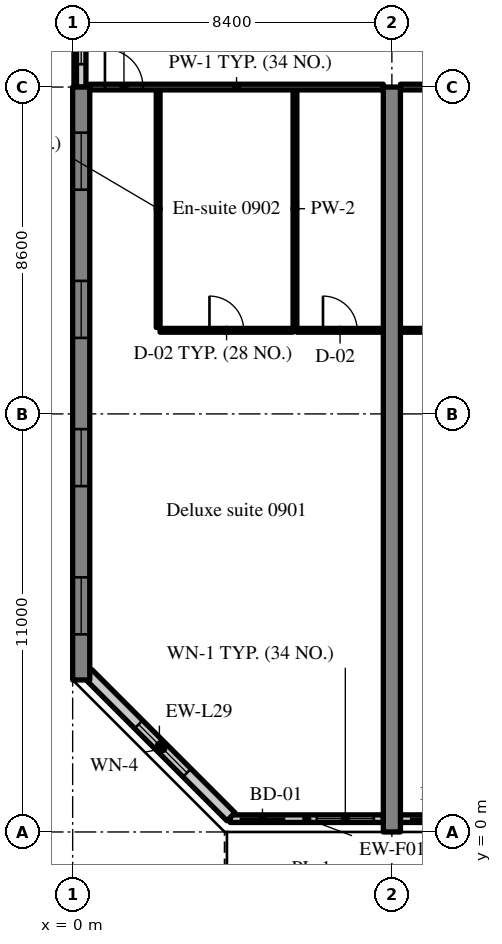
"""IFC4 building model, lengths in metres.
Left out: names, types, materials, properties, quantities, classifications, styles, units other than length and angle.
Written with IfcOpenShell. Run it as: python <this file> out.ifc"""

import sys

from ifc_helpers import new_model, si_unit, direction, frame, frame_2d, origin, place, context, subcontext, project, spatial, rectangle, extrude, source, transform, mapped, element, fill, save


model = new_model("IFC4")
c1 = context("Model", 3, precision=1e-05, world=origin(), true_north=direction((0.0, 1.0)))
c2 = subcontext(c1, "Body", "Model", "MODEL_VIEW")
j1 = project(units=[si_unit("LENGTHUNIT", "METRE"), si_unit("PLANEANGLEUNIT", "RADIAN")], contexts=[c1])
p1 = place(None, origin())
s1 = spatial("IfcSite", under=j1, at=p1, CompositionType="ELEMENT")
p2 = place(p1, origin())
s2 = spatial("IfcBuilding", under=s1, at=p2, CompositionType="ELEMENT")
p3 = place(p2, frame((0.0, 0.0, 43.0)))
s3 = spatial("IfcBuildingStorey", under=s2, at=p3, CompositionType="ELEMENT", Elevation=43.0)
m1 = source(origin(), c2, "Body", "SweptSolid", [
    extrude(rectangle(XDim=15.6, YDim=0.45, at=frame_2d((7.8, 0.0))), origin(), (0.0, 0.0, 1.0), 3.52),
])
p4 = place(p3, frame((0.225, 4.0, 0.0), z_axis=(0.0, 0.0, 1.0), x_axis=(0.0, 1.0, 0.0)))
e1 = element("IfcWall", 1, at=p4, inside=s3, PredefinedType="SHEAR", context=c2, shape_type="MappedRepresentation", body=[
    mapped(m1, transform((0.0, 0.0, 0.0), scale=1.0)),
])
m2 = source(origin(), c2, "Body", "SweptSolid", [
    extrude(rectangle(XDim=1.5, YDim=1.5, at=frame_2d((0.75, 0.75))), frame((0.0, 0.235, 0.0), z_axis=(0.0, -1.0, 0.0), x_axis=(1.0, 0.0, 0.0)), (0.0, 0.0, 1.0), 0.47),
])
p5 = place(p4, frame((1.2, 0.0, 0.9)))
e2 = element("IfcOpeningElement", 2, at=p5, cuts=e1, PredefinedType="OPENING", context=c2, shape_type="MappedRepresentation", body=[
    mapped(m2, transform((0.0, 0.0, 0.0), scale=1.0)),
])
p6 = place(p4, frame((5.1, 0.0, 0.9)))
e3 = element("IfcOpeningElement", 3, at=p6, cuts=e1, PredefinedType="OPENING", context=c2, shape_type="MappedRepresentation", body=[
    mapped(m2, transform((0.0, 0.0, 0.0), scale=1.0)),
])
p7 = place(p4, frame((9.0, 0.0, 0.9)))
e4 = element("IfcOpeningElement", 4, at=p7, cuts=e1, PredefinedType="OPENING", context=c2, shape_type="MappedRepresentation", body=[
    mapped(m2, transform((0.0, 0.0, 0.0), scale=1.0)),
])
p8 = place(p4, frame((12.9, 0.0, 0.9)))
e5 = element("IfcOpeningElement", 5, at=p8, cuts=e1, PredefinedType="OPENING", context=c2, shape_type="MappedRepresentation", body=[
    mapped(m2, transform((0.0, 0.0, 0.0), scale=1.0)),
])
m3 = source(origin(), c2, "Body", "SweptSolid", [
    extrude(rectangle(XDim=19.6, YDim=0.45, at=frame_2d((9.8, 0.0))), origin(), (0.0, 0.0, 1.0), 3.52),
])
p9 = place(p3, frame((8.4, 0.0, 0.0), z_axis=(0.0, 0.0, 1.0), x_axis=(0.0, 1.0, 0.0)))
e6 = element("IfcWall", 6, at=p9, inside=s3, PredefinedType="SHEAR", context=c2, shape_type="MappedRepresentation", body=[
    mapped(m3, transform((0.0, 0.0, 0.0), scale=1.0)),
])
m4 = source(origin(), c2, "Body", "SweptSolid", [
    extrude(rectangle(XDim=4.03, YDim=0.2, at=frame_2d((2.015, 0.0))), origin(), (0.0, 0.0, 1.0), 2.82),
])
p10 = place(p3, frame((4.145, 0.35, 0.0), z_axis=(0.0, 0.0, 1.0), x_axis=(1.0, 0.0, 0.0)))
e7 = element("IfcWall", 7, at=p10, inside=s3, PredefinedType="SOLIDWALL", context=c2, shape_type="MappedRepresentation", body=[
    mapped(m4, transform((0.0, 0.0, 0.0), scale=1.0)),
])
m5 = source(origin(), c2, "Body", "SweptSolid", [
    extrude(rectangle(XDim=1.2, YDim=2.4, at=frame_2d((0.6, 1.2))), frame((0.0, 0.11, 0.0), z_axis=(0.0, -1.0, 0.0), x_axis=(1.0, 0.0, 0.0)), (0.0, 0.0, 1.0), 0.22),
])
p11 = place(p10, frame((0.25, 0.0, 0.0)))
e8 = element("IfcOpeningElement", 8, at=p11, cuts=e7, PredefinedType="OPENING", context=c2, shape_type="MappedRepresentation", body=[
    mapped(m5, transform((0.0, 0.0, 0.0), scale=1.0)),
])
m6 = source(origin(), c2, "Body", "SweptSolid", [
    extrude(rectangle(XDim=1.5, YDim=1.5, at=frame_2d((0.75, 0.75))), frame((0.0, 0.11, 0.0), z_axis=(0.0, -1.0, 0.0), x_axis=(1.0, 0.0, 0.0)), (0.0, 0.0, 1.0), 0.22),
])
p12 = place(p10, frame((2.28, 0.0, 0.9)))
e9 = element("IfcOpeningElement", 9, at=p12, cuts=e7, PredefinedType="OPENING", context=c2, shape_type="MappedRepresentation", body=[
    mapped(m6, transform((0.0, 0.0, 0.0), scale=1.0)),
])
m7 = source(origin(), c2, "Body", "SweptSolid", [
    extrude(rectangle(XDim=3.525, YDim=0.2, at=frame_2d((1.762, 0.0))), origin(), (0.0, 0.0, 1.0), 2.82),
])
p13 = place(p3, frame((8.625, 0.35, 0.0), z_axis=(0.0, 0.0, 1.0), x_axis=(1.0, 0.0, 0.0)))
e10 = element("IfcWall", 10, at=p13, inside=s3, PredefinedType="SOLIDWALL", context=c2, shape_type="MappedRepresentation", body=[
    mapped(m7, transform((0.0, 0.0, 0.0), scale=1.0)),
])
p14 = place(p13, frame((0.25, 0.0, 0.0)))
e11 = element("IfcOpeningElement", 11, at=p14, cuts=e10, PredefinedType="OPENING", context=c2, shape_type="MappedRepresentation", body=[
    mapped(m5, transform((0.0, 0.0, 0.0), scale=1.0)),
])
p15 = place(p13, frame((1.775, 0.0, 0.9)))
e12 = element("IfcOpeningElement", 12, at=p15, cuts=e10, PredefinedType="OPENING", context=c2, shape_type="MappedRepresentation", body=[
    mapped(m6, transform((0.0, 0.0, 0.0), scale=1.0)),
])
m8 = source(origin(), c2, "Body", "SweptSolid", [
    extrude(rectangle(XDim=5.326, YDim=0.3, at=frame_2d((2.663, 0.0))), origin(), (0.0, 0.0, 1.0), 3.52),
])
p16 = place(p3, frame((0.4, 4.166, 0.0), z_axis=(0.0, 0.0, 1.0), x_axis=(0.707106781187, -0.707106781187, 0.0)))
e13 = element("IfcWall", 13, at=p16, inside=s3, PredefinedType="SOLIDWALL", context=c2, shape_type="MappedRepresentation", body=[
    mapped(m8, transform((0.0, 0.0, 0.0), scale=1.0)),
])
m9 = source(origin(), c2, "Body", "SweptSolid", [
    extrude(rectangle(XDim=1.8, YDim=1.5, at=frame_2d((0.9, 0.75))), frame((0.0, 0.16, 0.0), z_axis=(0.0, -1.0, 0.0), x_axis=(1.0, 0.0, 0.0)), (0.0, 0.0, 1.0), 0.32),
])
p17 = place(p16, frame((1.889, 0.0, 0.9)))
e14 = element("IfcOpeningElement", 14, at=p17, cuts=e13, PredefinedType="OPENING", context=c2, shape_type="MappedRepresentation", body=[
    mapped(m9, transform((0.0, 0.0, 0.0), scale=1.0)),
])
m10 = source(origin(), c2, "Body", "SweptSolid", [
    extrude(rectangle(XDim=2.4, YDim=0.25, at=frame_2d((1.2, 0.0))), origin(), (0.0, 0.0, 1.0), 2.62),
])
p18 = place(p3, frame((0.225, 19.6, 0.0), z_axis=(0.0, 0.0, 1.0), x_axis=(0.0, 1.0, 0.0)))
e15 = element("IfcWall", 15, at=p18, inside=s3, PredefinedType="SOLIDWALL", context=c2, shape_type="MappedRepresentation", body=[
    mapped(m10, transform((0.0, 0.0, 0.0), scale=1.0)),
])
m11 = source(origin(), c2, "Body", "SweptSolid", [
    extrude(rectangle(XDim=1.2, YDim=1.5, at=frame_2d((0.6, 0.75))), frame((0.0, 0.135, 0.0), z_axis=(0.0, -1.0, 0.0), x_axis=(1.0, 0.0, 0.0)), (0.0, 0.0, 1.0), 0.27),
])
p19 = place(p18, frame((0.6, 0.0, 0.9)))
e16 = element("IfcOpeningElement", 16, at=p19, cuts=e15, PredefinedType="OPENING", context=c2, shape_type="MappedRepresentation", body=[
    mapped(m11, transform((0.0, 0.0, 0.0), scale=1.0)),
])
m12 = source(origin(), c2, "Body", "SweptSolid", [
    extrude(rectangle(XDim=6.25, YDim=0.1, at=frame_2d((3.125, 0.0))), origin(), (0.0, 0.0, 1.0), 3.52),
])
for number, where, z_axis, x_axis in (
    (17, (2.25, 13.275, 0.0), (0.0, 0.0, 1.0), (0.0, 1.0, 0.0)),
    (18, (5.85, 13.275, 0.0), (0.0, 0.0, 1.0), (0.0, 1.0, 0.0)),
):
    element("IfcWall", number, at=place(p3, frame(where, z_axis=z_axis, x_axis=x_axis)), inside=s3, PredefinedType="PARTITIONING", context=c2, shape_type="MappedRepresentation", body=[
        mapped(m12, transform((0.0, 0.0, 0.0), scale=1.0)),
    ])
m13 = source(origin(), c2, "Body", "SweptSolid", [
    extrude(rectangle(XDim=3.5, YDim=0.1, at=frame_2d((1.75, 0.0))), origin(), (0.0, 0.0, 1.0), 3.52),
])
p20 = place(p3, frame((2.3, 13.2, 0.0), z_axis=(0.0, 0.0, 1.0), x_axis=(1.0, 0.0, 0.0)))
e19 = element("IfcWall", 19, at=p20, inside=s3, PredefinedType="PARTITIONING", context=c2, shape_type="MappedRepresentation", body=[
    mapped(m13, transform((0.0, 0.0, 0.0), scale=1.0)),
])
m14 = source(origin(), c2, "Body", "SweptSolid", [
    extrude(rectangle(XDim=0.9, YDim=2.1, at=frame_2d((0.45, 1.05))), frame((0.0, 0.06, 0.0), z_axis=(0.0, -1.0, 0.0), x_axis=(1.0, 0.0, 0.0)), (0.0, 0.0, 1.0), 0.12),
])
p21 = place(p20, frame((1.3, 0.0, 0.0)))
e20 = element("IfcOpeningElement", 20, at=p21, cuts=e19, PredefinedType="OPENING", context=c2, shape_type="MappedRepresentation", body=[
    mapped(m14, transform((0.0, 0.0, 0.0), scale=1.0)),
])
m15 = source(origin(), c2, "Body", "SweptSolid", [
    extrude(rectangle(XDim=2.275, YDim=0.1, at=frame_2d((1.138, 0.0))), origin(), (0.0, 0.0, 1.0), 3.52),
])
p22 = place(p3, frame((5.9, 13.2, 0.0), z_axis=(0.0, 0.0, 1.0), x_axis=(1.0, 0.0, 0.0)))
e21 = element("IfcWall", 21, at=p22, inside=s3, PredefinedType="PARTITIONING", context=c2, shape_type="MappedRepresentation", body=[
    mapped(m15, transform((0.0, 0.0, 0.0), scale=1.0)),
])
p23 = place(p22, frame((0.687, 0.0, 0.0)))
e22 = element("IfcOpeningElement", 22, at=p23, cuts=e21, PredefinedType="OPENING", context=c2, shape_type="MappedRepresentation", body=[
    mapped(m14, transform((0.0, 0.0, 0.0), scale=1.0)),
])
m16 = source(origin(), c2, "Body", "SweptSolid", [
    extrude(rectangle(XDim=7.725, YDim=0.15, at=frame_2d((3.863, 0.0))), origin(), (0.0, 0.0, 1.0), 2.82),
])
p24 = place(p3, frame((0.45, 19.6, 0.0), z_axis=(0.0, 0.0, 1.0), x_axis=(1.0, 0.0, 0.0)))
e23 = element("IfcWall", 23, at=p24, inside=s3, PredefinedType="PARTITIONING", context=c2, shape_type="MappedRepresentation", body=[
    mapped(m16, transform((0.0, 0.0, 0.0), scale=1.0)),
])
m17 = source(origin(), c2, "Body", "SweptSolid", [
    extrude(rectangle(XDim=1.0, YDim=2.1, at=frame_2d((0.5, 1.05))), frame((0.0, 0.085, 0.0), z_axis=(0.0, -1.0, 0.0), x_axis=(1.0, 0.0, 0.0)), (0.0, 0.0, 1.0), 0.17),
])
p25 = place(p24, frame((0.4, 0.0, 0.0)))
e24 = element("IfcOpeningElement", 24, at=p25, cuts=e23, PredefinedType="OPENING", context=c2, shape_type="MappedRepresentation", body=[
    mapped(m17, transform((0.0, 0.0, 0.0), scale=1.0)),
])
m18 = source(origin(), c2, "Body", "SweptSolid", [
    extrude(rectangle(XDim=2.05, YDim=0.1, at=frame_2d((1.025, 0.0))), origin(), (0.0, 0.0, 1.0), 3.52),
])
p26 = place(p3, frame((8.625, 13.2, 0.0), z_axis=(0.0, 0.0, 1.0), x_axis=(1.0, 0.0, 0.0)))
e25 = element("IfcWall", 25, at=p26, inside=s3, PredefinedType="PARTITIONING", context=c2, shape_type="MappedRepresentation", body=[
    mapped(m18, transform((0.0, 0.0, 0.0), scale=1.0)),
])
p27 = place(p26, frame((0.575, 0.0, 0.0)))
e26 = element("IfcOpeningElement", 26, at=p27, cuts=e25, PredefinedType="OPENING", context=c2, shape_type="MappedRepresentation", body=[
    mapped(m14, transform((0.0, 0.0, 0.0), scale=1.0)),
])
m19 = source(origin(), c2, "Body", "SweptSolid", [
    extrude(rectangle(XDim=3.9, YDim=0.15, at=frame_2d((1.95, 0.0))), origin(), (0.0, 0.0, 1.0), 2.82),
])
p28 = place(p3, frame((8.625, 19.6, 0.0), z_axis=(0.0, 0.0, 1.0), x_axis=(1.0, 0.0, 0.0)))
e27 = element("IfcWall", 27, at=p28, inside=s3, PredefinedType="PARTITIONING", context=c2, shape_type="MappedRepresentation", body=[
    mapped(m19, transform((0.0, 0.0, 0.0), scale=1.0)),
])
p29 = place(p28, frame((2.5, 0.0, 0.0)))
e28 = element("IfcOpeningElement", 28, at=p29, cuts=e27, PredefinedType="OPENING", context=c2, shape_type="MappedRepresentation", body=[
    mapped(m17, transform((0.0, 0.0, 0.0), scale=1.0)),
])
m20 = source(origin(), c2, "Body", "SweptSolid", [
    extrude(rectangle(XDim=1.2, YDim=2.4, at=frame_2d((0.6, 1.2))), frame((0.0, 0.025, 0.0), z_axis=(0.0, -1.0, 0.0), x_axis=(1.0, 0.0, 0.0)), (0.0, 0.0, 1.0), 0.05),
])
p30 = place(p11, origin())
e29 = element("IfcDoor", 29, at=p30, inside=s3, OperationType="SLIDING_TO_LEFT", PredefinedType="DOOR", context=c2, shape_type="MappedRepresentation", body=[
    mapped(m20, transform((0.0, 0.0, 0.0), scale=1.0)),
])
fill(e8, e29)
m21 = source(origin(), c2, "Body", "SweptSolid", [
    extrude(rectangle(XDim=1.5, YDim=1.5, at=frame_2d((0.75, 0.75))), frame((0.0, 0.03, 0.0), z_axis=(0.0, -1.0, 0.0), x_axis=(1.0, 0.0, 0.0)), (0.0, 0.0, 1.0), 0.06),
])
p31 = place(p12, origin())
e30 = element("IfcWindow", 30, at=p31, inside=s3, PartitioningType="SINGLE_PANEL", PredefinedType="WINDOW", context=c2, shape_type="MappedRepresentation", body=[
    mapped(m21, transform((0.0, 0.0, 0.0), scale=1.0)),
])
fill(e9, e30)
p32 = place(p14, origin())
e31 = element("IfcDoor", 31, at=p32, inside=s3, OperationType="SLIDING_TO_RIGHT", PredefinedType="DOOR", context=c2, shape_type="MappedRepresentation", body=[
    mapped(m20, transform((0.0, 0.0, 0.0), scale=1.0)),
])
fill(e11, e31)
m22 = source(origin(), c2, "Body", "SweptSolid", [
    extrude(rectangle(XDim=1.8, YDim=1.5, at=frame_2d((0.9, 0.75))), frame((0.0, 0.03, 0.0), z_axis=(0.0, -1.0, 0.0), x_axis=(1.0, 0.0, 0.0)), (0.0, 0.0, 1.0), 0.06),
])
p33 = place(p17, origin())
e32 = element("IfcWindow", 32, at=p33, inside=s3, PartitioningType="SINGLE_PANEL", PredefinedType="WINDOW", context=c2, shape_type="MappedRepresentation", body=[
    mapped(m22, transform((0.0, 0.0, 0.0), scale=1.0)),
])
fill(e14, e32)
p34 = place(p5, origin())
e33 = element("IfcWindow", 33, at=p34, inside=s3, PartitioningType="SINGLE_PANEL", PredefinedType="WINDOW", context=c2, shape_type="MappedRepresentation", body=[
    mapped(m21, transform((0.0, 0.0, 0.0), scale=1.0)),
])
fill(e2, e33)
p35 = place(p6, origin())
e34 = element("IfcWindow", 34, at=p35, inside=s3, PartitioningType="SINGLE_PANEL", PredefinedType="WINDOW", context=c2, shape_type="MappedRepresentation", body=[
    mapped(m21, transform((0.0, 0.0, 0.0), scale=1.0)),
])
fill(e3, e34)
p36 = place(p7, origin())
e35 = element("IfcWindow", 35, at=p36, inside=s3, PartitioningType="SINGLE_PANEL", PredefinedType="WINDOW", context=c2, shape_type="MappedRepresentation", body=[
    mapped(m21, transform((0.0, 0.0, 0.0), scale=1.0)),
])
fill(e4, e35)
p37 = place(p8, origin())
e36 = element("IfcWindow", 36, at=p37, inside=s3, PartitioningType="SINGLE_PANEL", PredefinedType="WINDOW", context=c2, shape_type="MappedRepresentation", body=[
    mapped(m21, transform((0.0, 0.0, 0.0), scale=1.0)),
])
fill(e5, e36)
m23 = source(origin(), c2, "Body", "SweptSolid", [
    extrude(rectangle(XDim=1.2, YDim=1.5, at=frame_2d((0.6, 0.75))), frame((0.0, 0.03, 0.0), z_axis=(0.0, -1.0, 0.0), x_axis=(1.0, 0.0, 0.0)), (0.0, 0.0, 1.0), 0.06),
])
p38 = place(p19, origin())
e37 = element("IfcWindow", 37, at=p38, inside=s3, PartitioningType="SINGLE_PANEL", PredefinedType="WINDOW", context=c2, shape_type="MappedRepresentation", body=[
    mapped(m23, transform((0.0, 0.0, 0.0), scale=1.0)),
])
fill(e16, e37)
m24 = source(origin(), c2, "Body", "SweptSolid", [
    extrude(rectangle(XDim=0.9, YDim=2.1, at=frame_2d((0.45, 1.05))), frame((0.0, 0.025, 0.0), z_axis=(0.0, -1.0, 0.0), x_axis=(1.0, 0.0, 0.0)), (0.0, 0.0, 1.0), 0.05),
])
p39 = place(p21, origin())
e38 = element("IfcDoor", 38, at=p39, inside=s3, OperationType="SINGLE_SWING_LEFT", PredefinedType="DOOR", context=c2, shape_type="MappedRepresentation", body=[
    mapped(m24, transform((0.0, 0.0, 0.0), scale=1.0)),
])
fill(e20, e38)
p40 = place(p23, origin())
e39 = element("IfcDoor", 39, at=p40, inside=s3, OperationType="SINGLE_SWING_LEFT", PredefinedType="DOOR", context=c2, shape_type="MappedRepresentation", body=[
    mapped(m24, transform((0.0, 0.0, 0.0), scale=1.0)),
])
fill(e22, e39)
m25 = source(origin(), c2, "Body", "SweptSolid", [
    extrude(rectangle(XDim=1.0, YDim=2.1, at=frame_2d((0.5, 1.05))), frame((0.0, 0.025, 0.0), z_axis=(0.0, -1.0, 0.0), x_axis=(1.0, 0.0, 0.0)), (0.0, 0.0, 1.0), 0.05),
])
p41 = place(p25, origin())
e40 = element("IfcDoor", 40, at=p41, inside=s3, OperationType="SINGLE_SWING_LEFT", PredefinedType="DOOR", context=c2, shape_type="MappedRepresentation", body=[
    mapped(m25, transform((0.0, 0.0, 0.0), scale=1.0)),
])
fill(e24, e40)
save(model, sys.argv[1])
